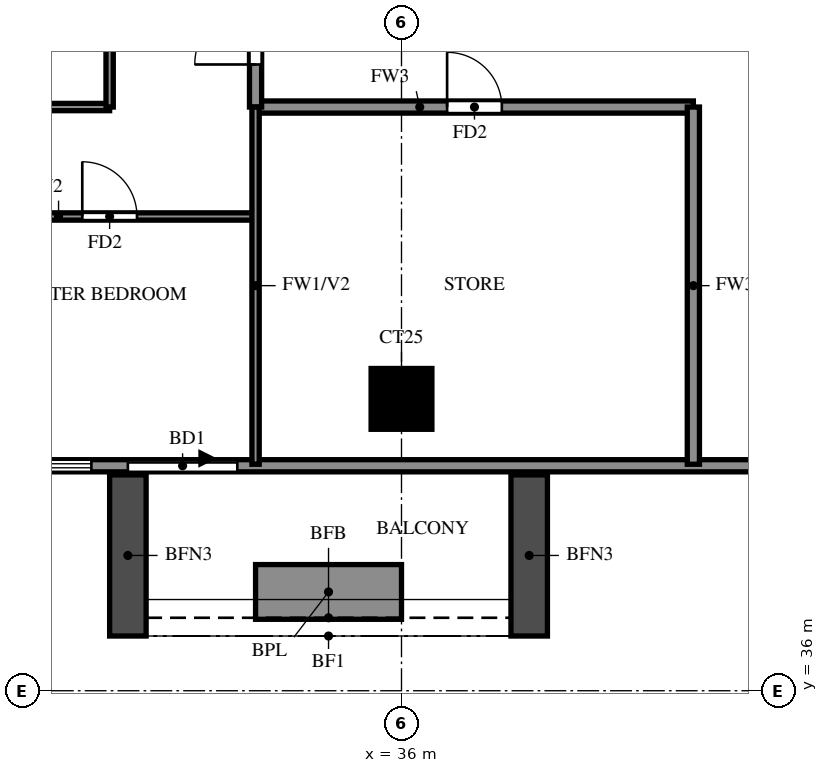
"""IFC4 building model, lengths in metres.
Left out: names, types, materials, properties, quantities, classifications, styles, units other than length and angle.
Written with IfcOpenShell. Run it as: python <this file> out.ifc"""

import sys

from ifc_helpers import new_model, si_unit, direction, frame, frame_2d, origin, origin_2d, place, context, subcontext, project, spatial, rectangle, extrude, source, transform, mapped, element, fill, save


model = new_model("IFC4")
c1 = context("Model", 3, precision=1e-05, world=origin(), true_north=direction((0.0, 1.0)))
c2 = subcontext(c1, "Body", "Model", "MODEL_VIEW")
j1 = project(units=[si_unit("LENGTHUNIT", "METRE"), si_unit("PLANEANGLEUNIT", "RADIAN")], contexts=[c1])
p1 = place(None, origin())
s1 = spatial("IfcSite", under=j1, at=p1, CompositionType="ELEMENT")
p2 = place(p1, origin())
s2 = spatial("IfcBuilding", under=s1, at=p2, CompositionType="ELEMENT")
p3 = place(p2, frame((0.0, 0.0, 153.5)))
s3 = spatial("IfcBuildingStorey", under=s2, at=p3, CompositionType="ELEMENT", Elevation=153.5)
m1 = source(origin(), c2, "Body", "SweptSolid", [
    extrude(rectangle(XDim=1.0, YDim=1.0, at=origin_2d()), origin(), (0.0, 0.0, 1.0), 3.2),
])
p4 = place(p3, frame((36.0, 40.8, 0.0), z_axis=(0.0, 0.0, 1.0), x_axis=(1.0, 0.0, 0.0)))
e1 = element("IfcColumn", 1, at=p4, inside=s3, PredefinedType="COLUMN", context=c2, shape_type="MappedRepresentation", body=[
    mapped(m1, transform((0.0, 0.0, 0.0))),
])
p5 = place(p3, frame((18.2, 39.7, 0.0), z_axis=(0.0, 0.0, 1.0), x_axis=(1.0, 0.0, 0.0)))
e2 = element("IfcWall", 2, at=p5, inside=s3, PredefinedType="SOLIDWALL", context=c2, shape_type="SweptSolid", body=[
    extrude(rectangle(XDim=23.8, YDim=0.2, at=frame_2d((11.9, 0.0))), origin(), (0.0, 0.0, 1.0), 3.2),
])
p6 = place(p5, frame((13.3, 0.0, 0.0)))
e3 = element("IfcOpeningElement", 3, at=p6, cuts=e2, PredefinedType="OPENING", context=c2, shape_type="SweptSolid", body=[
    extrude(rectangle(XDim=1.8, YDim=2.4, at=frame_2d((0.9, 1.2))), frame((0.0, 0.11, 0.0), z_axis=(0.0, -1.0, 0.0), x_axis=(1.0, 0.0, 0.0)), (0.0, 0.0, 1.0), 0.22),
])
p7 = place(p5, frame((0.9, 0.0, 0.6)))
e4 = element("IfcOpeningElement", 4, at=p7, cuts=e2, PredefinedType="OPENING", context=c2, shape_type="SweptSolid", body=[
    extrude(rectangle(XDim=2.4, YDim=2.4, at=frame_2d((1.2, 1.2))), frame((0.0, 0.11, 0.0), z_axis=(0.0, -1.0, 0.0), x_axis=(1.0, 0.0, 0.0)), (0.0, 0.0, 1.0), 0.22),
])
p8 = place(p5, frame((3.9, 0.0, 0.6)))
e5 = element("IfcOpeningElement", 5, at=p8, cuts=e2, PredefinedType="OPENING", context=c2, shape_type="SweptSolid", body=[
    extrude(rectangle(XDim=2.4, YDim=2.4, at=frame_2d((1.2, 1.2))), frame((0.0, 0.11, 0.0), z_axis=(0.0, -1.0, 0.0), x_axis=(1.0, 0.0, 0.0)), (0.0, 0.0, 1.0), 0.22),
])
p9 = place(p5, frame((10.9, 0.0, 0.6)))
e6 = element("IfcOpeningElement", 6, at=p9, cuts=e2, PredefinedType="OPENING", context=c2, shape_type="SweptSolid", body=[
    extrude(rectangle(XDim=1.8, YDim=2.4, at=frame_2d((0.9, 1.2))), frame((0.0, 0.11, 0.0), z_axis=(0.0, -1.0, 0.0), x_axis=(1.0, 0.0, 0.0)), (0.0, 0.0, 1.0), 0.22),
])
p10 = place(p5, frame((8.35, 0.0, 1.5)))
e7 = element("IfcOpeningElement", 7, at=p10, cuts=e2, PredefinedType="OPENING", context=c2, shape_type="SweptSolid", body=[
    extrude(rectangle(XDim=0.9, YDim=0.9, at=frame_2d((0.45, 0.45))), frame((0.0, 0.11, 0.0), z_axis=(0.0, -1.0, 0.0), x_axis=(1.0, 0.0, 0.0)), (0.0, 0.0, 1.0), 0.22),
])
for number, where, z_axis, x_axis in (
    (8, (31.5, 39.55, 0.0), (0.0, 0.0, 1.0), (0.0, -1.0, 0.0)),
    (9, (38.1, 39.55, 0.0), (0.0, 0.0, 1.0), (0.0, -1.0, 0.0)),
):
    element("IfcWall", number, at=place(p3, frame(where, z_axis=z_axis, x_axis=x_axis)), inside=s3, PredefinedType="SOLIDWALL", context=c2, shape_type="SweptSolid", body=[
        extrude(rectangle(XDim=2.65, YDim=0.6, at=frame_2d((1.325, 0.0))), origin(), (0.0, 0.0, 1.0), 2.85),
    ])
p11 = place(p3, frame((33.6, 37.625, 0.0), z_axis=(0.0, 0.0, 1.0), x_axis=(1.0, 0.0, 0.0)))
e10 = element("IfcWall", 10, at=p11, inside=s3, PredefinedType="SOLIDWALL", context=c2, shape_type="SweptSolid", body=[
    extrude(rectangle(XDim=2.4, YDim=0.9, at=frame_2d((1.2, 0.0))), origin(), (0.0, 0.0, 1.0), 0.9),
])
p12 = place(p3, frame((33.6, 45.6, 0.0), z_axis=(0.0, 0.0, 1.0), x_axis=(1.0, 0.0, 0.0)))
e11 = element("IfcWall", 11, at=p12, inside=s3, PredefinedType="SOLIDWALL", context=c2, shape_type="SweptSolid", body=[
    extrude(rectangle(XDim=7.2, YDim=0.2, at=frame_2d((3.6, 0.0))), origin(), (0.0, 0.0, 1.0), 3.2),
])
p13 = place(p12, frame((3.15, 0.0, 0.0)))
e12 = element("IfcOpeningElement", 12, at=p13, cuts=e11, PredefinedType="OPENING", context=c2, shape_type="SweptSolid", body=[
    extrude(rectangle(XDim=0.9, YDim=2.1, at=frame_2d((0.45, 1.05))), frame((0.0, 0.11, 0.0), z_axis=(0.0, -1.0, 0.0), x_axis=(1.0, 0.0, 0.0)), (0.0, 0.0, 1.0), 0.22),
])
p14 = place(p3, frame((33.6, 45.6, 0.0), z_axis=(0.0, 0.0, 1.0), x_axis=(0.0, 1.0, 0.0)))
e13 = element("IfcWall", 13, at=p14, inside=s3, PredefinedType="SOLIDWALL", context=c2, shape_type="SweptSolid", body=[
    extrude(rectangle(XDim=2.4, YDim=0.2, at=frame_2d((1.2, 0.0))), origin(), (0.0, 0.0, 1.0), 3.2),
])
p15 = place(p14, frame((0.7, 0.0, 0.0)))
e14 = element("IfcOpeningElement", 14, at=p15, cuts=e13, PredefinedType="OPENING", context=c2, shape_type="SweptSolid", body=[
    extrude(rectangle(XDim=1.0, YDim=2.1, at=frame_2d((0.5, 1.05))), frame((0.0, 0.11, 0.0), z_axis=(0.0, -1.0, 0.0), x_axis=(1.0, 0.0, 0.0)), (0.0, 0.0, 1.0), 0.22),
])
p16 = place(p3, frame((40.8, 39.725, 0.0), z_axis=(0.0, 0.0, 1.0), x_axis=(0.0, 1.0, 0.0)))
e15 = element("IfcWall", 15, at=p16, inside=s3, PredefinedType="SOLIDWALL", context=c2, shape_type="SweptSolid", body=[
    extrude(rectangle(XDim=5.875, YDim=0.2, at=frame_2d((2.938, 0.0))), origin(), (0.0, 0.0, 1.0), 3.2),
])
p17 = place(p3, frame((28.8, 43.8, 0.0), z_axis=(0.0, 0.0, 1.0), x_axis=(1.0, 0.0, 0.0)))
e16 = element("IfcWall", 16, at=p17, inside=s3, PredefinedType="PARTITIONING", context=c2, shape_type="SweptSolid", body=[
    extrude(rectangle(XDim=4.8, YDim=0.12, at=frame_2d((2.4, 0.0))), origin(), (0.0, 0.0, 1.0), 3.2),
])
p18 = place(p17, frame((1.95, 0.0, 0.0)))
e17 = element("IfcOpeningElement", 17, at=p18, cuts=e16, PredefinedType="OPENING", context=c2, shape_type="SweptSolid", body=[
    extrude(rectangle(XDim=0.9, YDim=2.1, at=frame_2d((0.45, 1.05))), frame((0.0, 0.07, 0.0), z_axis=(0.0, -1.0, 0.0), x_axis=(1.0, 0.0, 0.0)), (0.0, 0.0, 1.0), 0.14),
])
p19 = place(p3, frame((25.2, 45.6, 0.0), z_axis=(0.0, 0.0, 1.0), x_axis=(1.0, 0.0, 0.0)))
e18 = element("IfcWall", 18, at=p19, inside=s3, PredefinedType="PARTITIONING", context=c2, shape_type="SweptSolid", body=[
    extrude(rectangle(XDim=6.0, YDim=0.12, at=frame_2d((3.0, 0.0))), origin(), (0.0, 0.0, 1.0), 3.2),
])
p20 = place(p19, frame((0.75, 0.0, 0.0)))
e19 = element("IfcOpeningElement", 19, at=p20, cuts=e18, PredefinedType="OPENING", context=c2, shape_type="SweptSolid", body=[
    extrude(rectangle(XDim=0.8, YDim=2.1, at=frame_2d((0.4, 1.05))), frame((0.0, 0.07, 0.0), z_axis=(0.0, -1.0, 0.0), x_axis=(1.0, 0.0, 0.0)), (0.0, 0.0, 1.0), 0.14),
])
p21 = place(p19, frame((3.7, 0.0, 0.0)))
e20 = element("IfcOpeningElement", 20, at=p21, cuts=e18, PredefinedType="OPENING", context=c2, shape_type="SweptSolid", body=[
    extrude(rectangle(XDim=0.9, YDim=2.1, at=frame_2d((0.45, 1.05))), frame((0.0, 0.07, 0.0), z_axis=(0.0, -1.0, 0.0), x_axis=(1.0, 0.0, 0.0)), (0.0, 0.0, 1.0), 0.14),
])
p22 = place(p3, frame((31.2, 45.6, 0.0), z_axis=(0.0, 0.0, 1.0), x_axis=(0.0, 1.0, 0.0)))
e21 = element("IfcWall", 21, at=p22, inside=s3, PredefinedType="PARTITIONING", context=c2, shape_type="SweptSolid", body=[
    extrude(rectangle(XDim=2.4, YDim=0.12, at=frame_2d((1.2, 0.0))), origin(), (0.0, 0.0, 1.0), 3.2),
])
p23 = place(p3, frame((33.6, 39.725, 0.0), z_axis=(0.0, 0.0, 1.0), x_axis=(0.0, 1.0, 0.0)))
e22 = element("IfcWall", 22, at=p23, inside=s3, PredefinedType="PARTITIONING", context=c2, shape_type="SweptSolid", body=[
    extrude(rectangle(XDim=5.875, YDim=0.12, at=frame_2d((2.938, 0.0))), origin(), (0.0, 0.0, 1.0), 3.2),
])
p24 = place(p6, origin())
e23 = element("IfcDoor", 23, at=p24, inside=s3, OperationType="DOUBLE_DOOR_SLIDING", PredefinedType="DOOR", context=c2, shape_type="SweptSolid", body=[
    extrude(rectangle(XDim=1.8, YDim=2.4, at=frame_2d((0.9, 1.2))), frame((0.0, 0.025, 0.0), z_axis=(0.0, -1.0, 0.0), x_axis=(1.0, 0.0, 0.0)), (0.0, 0.0, 1.0), 0.05),
])
fill(e3, e23)
p25 = place(p9, origin())
e24 = element("IfcWindow", 24, at=p25, inside=s3, PartitioningType="DOUBLE_PANEL_VERTICAL", PredefinedType="WINDOW", context=c2, shape_type="SweptSolid", body=[
    extrude(rectangle(XDim=1.8, YDim=2.4, at=frame_2d((0.9, 1.2))), frame((0.0, 0.03, 0.0), z_axis=(0.0, -1.0, 0.0), x_axis=(1.0, 0.0, 0.0)), (0.0, 0.0, 1.0), 0.06),
])
fill(e6, e24)
p26 = place(p15, origin())
e25 = element("IfcDoor", 25, at=p26, inside=s3, OperationType="SINGLE_SWING_LEFT", PredefinedType="DOOR", context=c2, shape_type="SweptSolid", body=[
    extrude(rectangle(XDim=1.0, YDim=2.1, at=frame_2d((0.5, 1.05))), frame((0.0, 0.025, 0.0), z_axis=(0.0, -1.0, 0.0), x_axis=(1.0, 0.0, 0.0)), (0.0, 0.0, 1.0), 0.05),
])
fill(e14, e25)
p27 = place(p18, origin())
e26 = element("IfcDoor", 26, at=p27, inside=s3, OperationType="SINGLE_SWING_RIGHT", PredefinedType="DOOR", context=c2, shape_type="SweptSolid", body=[
    extrude(rectangle(XDim=0.9, YDim=2.1, at=frame_2d((0.45, 1.05))), frame((0.0, 0.025, 0.0), z_axis=(0.0, -1.0, 0.0), x_axis=(1.0, 0.0, 0.0)), (0.0, 0.0, 1.0), 0.05),
])
fill(e17, e26)
p28 = place(p13, origin())
e27 = element("IfcDoor", 27, at=p28, inside=s3, OperationType="SINGLE_SWING_LEFT", PredefinedType="DOOR", context=c2, shape_type="SweptSolid", body=[
    extrude(rectangle(XDim=0.9, YDim=2.1, at=frame_2d((0.45, 1.05))), frame((0.0, 0.025, 0.0), z_axis=(0.0, -1.0, 0.0), x_axis=(1.0, 0.0, 0.0)), (0.0, 0.0, 1.0), 0.05),
])
fill(e12, e27)
save(model, sys.argv[1])
